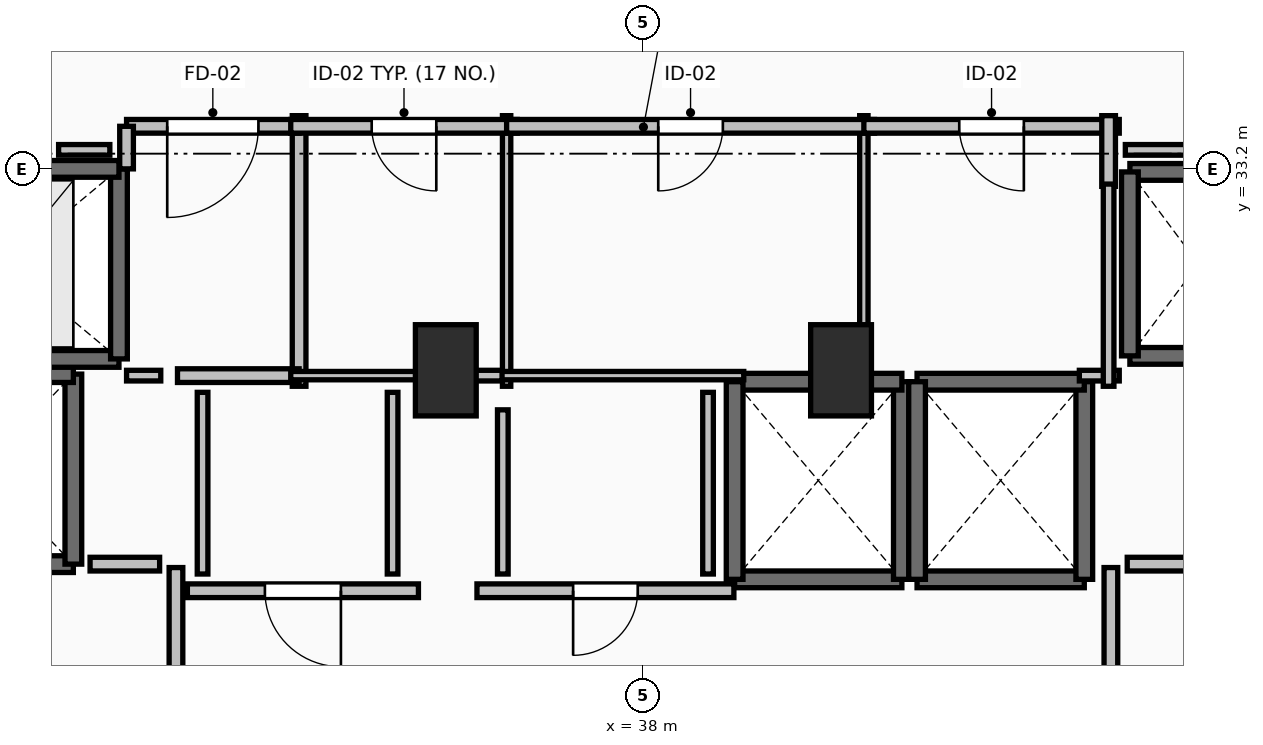
"""IFC4 building model, lengths in metres.
Left out: names, types, materials, properties, quantities, classifications, styles, units other than length and angle.
Written with IfcOpenShell. Run it as: python <this file> out.ifc"""

import sys

from ifc_helpers import new_model, si_unit, direction, frame, frame_2d, origin, origin_2d, place, context, subcontext, project, spatial, rectangle, extrude, element, fill, save


model = new_model("IFC4")
c1 = context("Model", 3, precision=1e-05, world=origin(), true_north=direction((0.0, 1.0)))
c2 = subcontext(c1, "Body", "Model", "MODEL_VIEW")
j1 = project(units=[si_unit("LENGTHUNIT", "METRE"), si_unit("PLANEANGLEUNIT", "RADIAN")], contexts=[c1])
p1 = place(None, origin())
s1 = spatial("IfcSite", under=j1, at=p1, CompositionType="ELEMENT")
p2 = place(p1, origin())
s2 = spatial("IfcBuilding", under=s1, at=p2, CompositionType="ELEMENT")
p3 = place(p2, frame((0.0, 0.0, 171.1)))
s3 = spatial("IfcBuildingStorey", under=s2, at=p3, CompositionType="ELEMENT", Elevation=171.1)
for number, where, z_axis, x_axis in (
    (1, (35.4, 30.55, 0.0), (0.0, 0.0, 1.0), (1.0, 0.0, 0.0)),
    (2, (40.6, 30.55, 0.0), (0.0, 0.0, 1.0), (1.0, 0.0, 0.0)),
):
    element("IfcColumn", number, at=place(p3, frame(where, z_axis=z_axis, x_axis=x_axis)), inside=s3, PredefinedType="PILASTER", context=c2, shape_type="SweptSolid", body=[
        extrude(rectangle(XDim=0.8, YDim=1.2, at=origin_2d()), origin(), (0.0, 0.0, 1.0), 3.5),
    ])
p4 = place(p3, frame((39.2, 27.8, 0.0), z_axis=(0.0, 0.0, 1.0), x_axis=(1.0, 0.0, 0.0)))
e3 = element("IfcWall", 3, at=p4, inside=s3, PredefinedType="SOLIDWALL", context=c2, shape_type="SweptSolid", body=[
    extrude(rectangle(XDim=2.2, YDim=0.22, at=frame_2d((1.1, 0.0))), origin(), (0.0, 0.0, 1.0), 3.2),
])
p5 = place(p3, frame((41.4, 27.8, 0.0), z_axis=(0.0, 0.0, 1.0), x_axis=(0.0, 1.0, 0.0)))
e4 = element("IfcWall", 4, at=p5, inside=s3, PredefinedType="SOLIDWALL", context=c2, shape_type="SweptSolid", body=[
    extrude(rectangle(XDim=2.6, YDim=0.22, at=frame_2d((1.3, 0.0))), origin(), (0.0, 0.0, 1.0), 3.2),
])
p6 = place(p3, frame((41.4, 30.4, 0.0), z_axis=(0.0, 0.0, 1.0), x_axis=(-1.0, 0.0, 0.0)))
e5 = element("IfcWall", 5, at=p6, inside=s3, PredefinedType="SOLIDWALL", context=c2, shape_type="SweptSolid", body=[
    extrude(rectangle(XDim=2.2, YDim=0.22, at=frame_2d((1.1, 0.0))), origin(), (0.0, 0.0, 1.0), 3.2),
])
p7 = place(p3, frame((39.2, 30.4, 0.0), z_axis=(0.0, 0.0, 1.0), x_axis=(0.0, -1.0, 0.0)))
e6 = element("IfcWall", 6, at=p7, inside=s3, PredefinedType="SOLIDWALL", context=c2, shape_type="SweptSolid", body=[
    extrude(rectangle(XDim=2.6, YDim=0.22, at=frame_2d((1.3, 0.0))), origin(), (0.0, 0.0, 1.0), 3.2),
])
p8 = place(p3, frame((41.6, 27.8, 0.0), z_axis=(0.0, 0.0, 1.0), x_axis=(1.0, 0.0, 0.0)))
e7 = element("IfcWall", 7, at=p8, inside=s3, PredefinedType="SOLIDWALL", context=c2, shape_type="SweptSolid", body=[
    extrude(rectangle(XDim=2.2, YDim=0.22, at=frame_2d((1.1, 0.0))), origin(), (0.0, 0.0, 1.0), 3.2),
])
p9 = place(p3, frame((43.8, 27.8, 0.0), z_axis=(0.0, 0.0, 1.0), x_axis=(0.0, 1.0, 0.0)))
e8 = element("IfcWall", 8, at=p9, inside=s3, PredefinedType="SOLIDWALL", context=c2, shape_type="SweptSolid", body=[
    extrude(rectangle(XDim=2.6, YDim=0.22, at=frame_2d((1.3, 0.0))), origin(), (0.0, 0.0, 1.0), 3.2),
])
p10 = place(p3, frame((43.8, 30.4, 0.0), z_axis=(0.0, 0.0, 1.0), x_axis=(-1.0, 0.0, 0.0)))
e9 = element("IfcWall", 9, at=p10, inside=s3, PredefinedType="SOLIDWALL", context=c2, shape_type="SweptSolid", body=[
    extrude(rectangle(XDim=2.2, YDim=0.22, at=frame_2d((1.1, 0.0))), origin(), (0.0, 0.0, 1.0), 3.2),
])
p11 = place(p3, frame((41.6, 30.4, 0.0), z_axis=(0.0, 0.0, 1.0), x_axis=(0.0, -1.0, 0.0)))
e10 = element("IfcWall", 10, at=p11, inside=s3, PredefinedType="SOLIDWALL", context=c2, shape_type="SweptSolid", body=[
    extrude(rectangle(XDim=2.6, YDim=0.22, at=frame_2d((1.3, 0.0))), origin(), (0.0, 0.0, 1.0), 3.2),
])
for number, where, z_axis, x_axis in (
    (11, (44.4, 30.74, 0.0), (0.0, 0.0, 1.0), (1.0, 0.0, 0.0)),
    (12, (46.2, 33.16, 0.0), (0.0, 0.0, 1.0), (-1.0, 0.0, 0.0)),
):
    element("IfcWall", number, at=place(p3, frame(where, z_axis=z_axis, x_axis=x_axis)), inside=s3, PredefinedType="SOLIDWALL", context=c2, shape_type="SweptSolid", body=[
        extrude(rectangle(XDim=1.8, YDim=0.22, at=frame_2d((0.9, 0.0))), origin(), (0.0, 0.0, 1.0), 3.2),
    ])
p12 = place(p3, frame((44.4, 33.16, 0.0), z_axis=(0.0, 0.0, 1.0), x_axis=(0.0, -1.0, 0.0)))
e13 = element("IfcWall", 13, at=p12, inside=s3, PredefinedType="SOLIDWALL", context=c2, shape_type="SweptSolid", body=[
    extrude(rectangle(XDim=2.42, YDim=0.22, at=frame_2d((1.21, 0.0))), origin(), (0.0, 0.0, 1.0), 3.2),
])
p13 = place(p3, frame((28.1, 28.0, 0.0), z_axis=(0.0, 0.0, 1.0), x_axis=(1.0, 0.0, 0.0)))
e14 = element("IfcWall", 14, at=p13, inside=s3, PredefinedType="SHEAR", context=c2, shape_type="SweptSolid", body=[
    extrude(rectangle(XDim=2.4, YDim=0.22, at=frame_2d((1.2, 0.0))), origin(), (0.0, 0.0, 1.0), 3.2),
])
p14 = place(p13, frame((0.6, 0.0, 0.0)))
e15 = element("IfcOpeningElement", 15, at=p14, cuts=e14, PredefinedType="OPENING", context=c2, shape_type="SweptSolid", body=[
    extrude(rectangle(XDim=1.2, YDim=2.2, at=frame_2d((0.6, 1.1))), frame((0.0, 0.125, 0.0), z_axis=(0.0, -1.0, 0.0), x_axis=(1.0, 0.0, 0.0)), (0.0, 0.0, 1.0), 0.25),
])
p15 = place(p3, frame((30.5, 28.0, 0.0), z_axis=(0.0, 0.0, 1.0), x_axis=(0.0, 1.0, 0.0)))
e16 = element("IfcWall", 16, at=p15, inside=s3, PredefinedType="SHEAR", context=c2, shape_type="SweptSolid", body=[
    extrude(rectangle(XDim=2.5, YDim=0.22, at=frame_2d((1.25, 0.0))), origin(), (0.0, 0.0, 1.0), 3.2),
])
p16 = place(p3, frame((30.5, 30.5, 0.0), z_axis=(0.0, 0.0, 1.0), x_axis=(-1.0, 0.0, 0.0)))
e17 = element("IfcWall", 17, at=p16, inside=s3, PredefinedType="SHEAR", context=c2, shape_type="SweptSolid", body=[
    extrude(rectangle(XDim=2.4, YDim=0.22, at=frame_2d((1.2, 0.0))), origin(), (0.0, 0.0, 1.0), 3.2),
])
p17 = place(p3, frame((28.1, 30.7, 0.0), z_axis=(0.0, 0.0, 1.0), x_axis=(1.0, 0.0, 0.0)))
e18 = element("IfcWall", 18, at=p17, inside=s3, PredefinedType="SOLIDWALL", context=c2, shape_type="SweptSolid", body=[
    extrude(rectangle(XDim=3.0, YDim=0.22, at=frame_2d((1.5, 0.0))), origin(), (0.0, 0.0, 1.0), 3.2),
])
p18 = place(p3, frame((31.1, 30.7, 0.0), z_axis=(0.0, 0.0, 1.0), x_axis=(0.0, 1.0, 0.0)))
e19 = element("IfcWall", 19, at=p18, inside=s3, PredefinedType="SOLIDWALL", context=c2, shape_type="SweptSolid", body=[
    extrude(rectangle(XDim=2.5, YDim=0.22, at=frame_2d((1.25, 0.0))), origin(), (0.0, 0.0, 1.0), 3.2),
])
p19 = place(p3, frame((31.1, 33.2, 0.0), z_axis=(0.0, 0.0, 1.0), x_axis=(-1.0, 0.0, 0.0)))
e20 = element("IfcWall", 20, at=p19, inside=s3, PredefinedType="SOLIDWALL", context=c2, shape_type="SweptSolid", body=[
    extrude(rectangle(XDim=3.0, YDim=0.22, at=frame_2d((1.5, 0.0))), origin(), (0.0, 0.0, 1.0), 3.2),
])
p20 = place(p19, frame((0.9, 0.0, 0.0)))
e21 = element("IfcOpeningElement", 21, at=p20, cuts=e20, PredefinedType="OPENING", context=c2, shape_type="SweptSolid", body=[
    extrude(rectangle(XDim=1.2, YDim=2.2, at=frame_2d((0.6, 1.1))), frame((0.0, 0.125, 0.0), z_axis=(0.0, -1.0, 0.0), x_axis=(1.0, 0.0, 0.0)), (0.0, 0.0, 1.0), 0.25),
])
p21 = place(p3, frame((31.85, 24.045, 0.0), z_axis=(0.0, 0.0, 1.0), x_axis=(0.0, 1.0, 0.0)))
e22 = element("IfcWall", 22, at=p21, inside=s3, PredefinedType="PARTITIONING", context=c2, shape_type="SweptSolid", body=[
    extrude(rectangle(XDim=3.91, YDim=0.18, at=frame_2d((1.955, 0.0))), origin(), (0.0, 0.0, 1.0), 3.2),
])
p22 = place(p21, frame((1.355, 0.0, 0.0)))
e23 = element("IfcOpeningElement", 23, at=p22, cuts=e22, PredefinedType="OPENING", context=c2, shape_type="SweptSolid", body=[
    extrude(rectangle(XDim=1.2, YDim=2.15, at=frame_2d((0.6, 1.075))), frame((0.0, 0.105, 0.0), z_axis=(0.0, -1.0, 0.0), x_axis=(1.0, 0.0, 0.0)), (0.0, 0.0, 1.0), 0.21),
])
p23 = place(p3, frame((44.15, 27.955, 0.0), z_axis=(0.0, 0.0, 1.0), x_axis=(0.0, -1.0, 0.0)))
e24 = element("IfcWall", 24, at=p23, inside=s3, PredefinedType="PARTITIONING", context=c2, shape_type="SweptSolid", body=[
    extrude(rectangle(XDim=3.91, YDim=0.18, at=frame_2d((1.955, 0.0))), origin(), (0.0, 0.0, 1.0), 3.2),
])
p24 = place(p23, frame((1.355, 0.0, 0.0)))
e25 = element("IfcOpeningElement", 25, at=p24, cuts=e24, PredefinedType="OPENING", context=c2, shape_type="SweptSolid", body=[
    extrude(rectangle(XDim=1.2, YDim=2.15, at=frame_2d((0.6, 1.075))), frame((0.0, 0.105, 0.0), z_axis=(0.0, -1.0, 0.0), x_axis=(1.0, 0.0, 0.0)), (0.0, 0.0, 1.0), 0.21),
])
p25 = place(p3, frame((33.47, 30.34, 0.0), z_axis=(0.0, 0.0, 1.0), x_axis=(0.0, 1.0, 0.0)))
e26 = element("IfcWall", 26, at=p25, inside=s3, PredefinedType="PARTITIONING", context=c2, shape_type="SweptSolid", body=[
    extrude(rectangle(XDim=3.56, YDim=0.18, at=frame_2d((1.78, 0.0))), origin(), (0.0, 0.0, 1.0), 3.2),
])
p26 = place(p3, frame((31.87, 30.48, 0.0), z_axis=(0.0, 0.0, 1.0), x_axis=(1.0, 0.0, 0.0)))
e27 = element("IfcWall", 27, at=p26, inside=s3, PredefinedType="PARTITIONING", context=c2, shape_type="SweptSolid", body=[
    extrude(rectangle(XDim=1.6, YDim=0.18, at=frame_2d((0.8, 0.0))), origin(), (0.0, 0.0, 1.0), 3.2),
])
p27 = place(p3, frame((33.47, 33.76, 0.0), z_axis=(0.0, 0.0, 1.0), x_axis=(-1.0, 0.0, 0.0)))
e28 = element("IfcWall", 28, at=p27, inside=s3, PredefinedType="PARTITIONING", context=c2, shape_type="SweptSolid", body=[
    extrude(rectangle(XDim=2.27, YDim=0.18, at=frame_2d((1.135, 0.0))), origin(), (0.0, 0.0, 1.0), 3.2),
])
p28 = place(p27, frame((0.535, 0.0, 0.0)))
e29 = element("IfcOpeningElement", 29, at=p28, cuts=e28, PredefinedType="OPENING", context=c2, shape_type="SweptSolid", body=[
    extrude(rectangle(XDim=1.2, YDim=2.15, at=frame_2d((0.6, 1.075))), frame((0.0, 0.105, 0.0), z_axis=(0.0, -1.0, 0.0), x_axis=(1.0, 0.0, 0.0)), (0.0, 0.0, 1.0), 0.21),
])
p29 = place(p3, frame((31.2, 33.76, 0.0), z_axis=(0.0, 0.0, 1.0), x_axis=(0.0, -1.0, 0.0)))
e30 = element("IfcWall", 30, at=p29, inside=s3, PredefinedType="PARTITIONING", context=c2, shape_type="SweptSolid", body=[
    extrude(rectangle(XDim=0.56, YDim=0.18, at=frame_2d((0.28, 0.0))), origin(), (0.0, 0.0, 1.0), 3.2),
])
p30 = place(p3, frame((35.04, 27.65, 0.0), z_axis=(0.0, 0.0, 1.0), x_axis=(-1.0, 0.0, 0.0)))
e31 = element("IfcWall", 31, at=p30, inside=s3, PredefinedType="PARTITIONING", context=c2, shape_type="SweptSolid", body=[
    extrude(rectangle(XDim=3.04, YDim=0.18, at=frame_2d((1.52, 0.0))), origin(), (0.0, 0.0, 1.0), 3.2),
])
p31 = place(p30, frame((1.02, 0.0, 0.0)))
e32 = element("IfcOpeningElement", 32, at=p31, cuts=e31, PredefinedType="OPENING", context=c2, shape_type="SweptSolid", body=[
    extrude(rectangle(XDim=1.0, YDim=2.15, at=frame_2d((0.5, 1.075))), frame((0.0, 0.105, 0.0), z_axis=(0.0, -1.0, 0.0), x_axis=(1.0, 0.0, 0.0)), (0.0, 0.0, 1.0), 0.21),
])
p32 = place(p3, frame((39.19, 27.65, 0.0), z_axis=(0.0, 0.0, 1.0), x_axis=(-1.0, 0.0, 0.0)))
e33 = element("IfcWall", 33, at=p32, inside=s3, PredefinedType="PARTITIONING", context=c2, shape_type="SweptSolid", body=[
    extrude(rectangle(XDim=3.38, YDim=0.18, at=frame_2d((1.69, 0.0))), origin(), (0.0, 0.0, 1.0), 3.2),
])
p33 = place(p32, frame((1.265, 0.0, 0.0)))
e34 = element("IfcOpeningElement", 34, at=p33, cuts=e33, PredefinedType="OPENING", context=c2, shape_type="SweptSolid", body=[
    extrude(rectangle(XDim=0.85, YDim=2.1, at=frame_2d((0.425, 1.05))), frame((0.0, 0.105, 0.0), z_axis=(0.0, -1.0, 0.0), x_axis=(1.0, 0.0, 0.0)), (0.0, 0.0, 1.0), 0.21),
])
p34 = place(p3, frame((36.2, 30.34, 0.0), z_axis=(0.0, 0.0, 1.0), x_axis=(0.0, 1.0, 0.0)))
e35 = element("IfcWall", 35, at=p34, inside=s3, PredefinedType="PARTITIONING", context=c2, shape_type="SweptSolid", body=[
    extrude(rectangle(XDim=3.56, YDim=0.11, at=frame_2d((1.78, 0.0))), origin(), (0.0, 0.0, 1.0), 2.392),
])
p35 = place(p3, frame((33.36, 30.48, 0.0), z_axis=(0.0, 0.0, 1.0), x_axis=(1.0, 0.0, 0.0)))
e36 = element("IfcWall", 36, at=p35, inside=s3, PredefinedType="PARTITIONING", context=c2, shape_type="SweptSolid", body=[
    extrude(rectangle(XDim=1.81, YDim=0.11, at=frame_2d((0.905, 0.0))), origin(), (0.0, 0.0, 1.0), 3.2),
])
p36 = place(p3, frame((36.34, 33.76, 0.0), z_axis=(0.0, 0.0, 1.0), x_axis=(-1.0, 0.0, 0.0)))
e37 = element("IfcWall", 37, at=p36, inside=s3, PredefinedType="PARTITIONING", context=c2, shape_type="SweptSolid", body=[
    extrude(rectangle(XDim=2.98, YDim=0.18, at=frame_2d((1.49, 0.0))), origin(), (0.0, 0.0, 1.0), 3.2),
])
p37 = place(p36, frame((1.065, 0.0, 0.0)))
e38 = element("IfcOpeningElement", 38, at=p37, cuts=e37, PredefinedType="OPENING", context=c2, shape_type="SweptSolid", body=[
    extrude(rectangle(XDim=0.85, YDim=2.1, at=frame_2d((0.425, 1.05))), frame((0.0, 0.105, 0.0), z_axis=(0.0, -1.0, 0.0), x_axis=(1.0, 0.0, 0.0)), (0.0, 0.0, 1.0), 0.21),
])
p38 = place(p3, frame((40.9, 30.34, 0.0), z_axis=(0.0, 0.0, 1.0), x_axis=(0.0, 1.0, 0.0)))
e39 = element("IfcWall", 39, at=p38, inside=s3, PredefinedType="PARTITIONING", context=c2, shape_type="SweptSolid", body=[
    extrude(rectangle(XDim=3.56, YDim=0.11, at=frame_2d((1.78, 0.0))), origin(), (0.0, 0.0, 1.0), 3.2),
])
p39 = place(p3, frame((36.11, 30.48, 0.0), z_axis=(0.0, 0.0, 1.0), x_axis=(1.0, 0.0, 0.0)))
e40 = element("IfcWall", 40, at=p39, inside=s3, PredefinedType="PARTITIONING", context=c2, shape_type="SweptSolid", body=[
    extrude(rectangle(XDim=3.21, YDim=0.11, at=frame_2d((1.605, 0.0))), origin(), (0.0, 0.0, 1.0), 2.392),
])
p40 = place(p3, frame((41.04, 33.76, 0.0), z_axis=(0.0, 0.0, 1.0), x_axis=(-1.0, 0.0, 0.0)))
e41 = element("IfcWall", 41, at=p40, inside=s3, PredefinedType="PARTITIONING", context=c2, shape_type="SweptSolid", body=[
    extrude(rectangle(XDim=4.84, YDim=0.18, at=frame_2d((2.42, 0.0))), origin(), (0.0, 0.0, 1.0), 3.2),
])
p41 = place(p40, frame((1.995, 0.0, 0.0)))
e42 = element("IfcOpeningElement", 42, at=p41, cuts=e41, PredefinedType="OPENING", context=c2, shape_type="SweptSolid", body=[
    extrude(rectangle(XDim=0.85, YDim=2.1, at=frame_2d((0.425, 1.05))), frame((0.0, 0.105, 0.0), z_axis=(0.0, -1.0, 0.0), x_axis=(1.0, 0.0, 0.0)), (0.0, 0.0, 1.0), 0.21),
])
p42 = place(p3, frame((44.26, 33.76, 0.0), z_axis=(0.0, 0.0, 1.0), x_axis=(-1.0, 0.0, 0.0)))
e43 = element("IfcWall", 43, at=p42, inside=s3, PredefinedType="PARTITIONING", context=c2, shape_type="SweptSolid", body=[
    extrude(rectangle(XDim=3.36, YDim=0.18, at=frame_2d((1.68, 0.0))), origin(), (0.0, 0.0, 1.0), 3.2),
])
p43 = place(p42, frame((1.255, 0.0, 0.0)))
e44 = element("IfcOpeningElement", 44, at=p43, cuts=e43, PredefinedType="OPENING", context=c2, shape_type="SweptSolid", body=[
    extrude(rectangle(XDim=0.85, YDim=2.1, at=frame_2d((0.425, 1.05))), frame((0.0, 0.105, 0.0), z_axis=(0.0, -1.0, 0.0), x_axis=(1.0, 0.0, 0.0)), (0.0, 0.0, 1.0), 0.21),
])
p44 = place(p3, frame((44.12, 32.97, 0.0), z_axis=(0.0, 0.0, 1.0), x_axis=(0.0, 1.0, 0.0)))
e45 = element("IfcWall", 45, at=p44, inside=s3, PredefinedType="PARTITIONING", context=c2, shape_type="SweptSolid", body=[
    extrude(rectangle(XDim=0.93, YDim=0.18, at=frame_2d((0.465, 0.0))), origin(), (0.0, 0.0, 1.0), 3.2),
])
for number, where, z_axis, x_axis in (
    (46, (31.635, 28.0, 0.0), (0.0, 0.0, 1.0), (-1.0, 0.0, 0.0)),
    (47, (45.28, 28.0, 0.0), (0.0, 0.0, 1.0), (-1.0, 0.0, 0.0)),
):
    element("IfcWall", number, at=place(p3, frame(where, z_axis=z_axis, x_axis=x_axis)), inside=s3, PredefinedType="PARTITIONING", context=c2, shape_type="SweptSolid", body=[
        extrude(rectangle(XDim=0.915, YDim=0.18, at=frame_2d((0.458, 0.0))), origin(), (0.0, 0.0, 1.0), 3.2),
    ])
p45 = place(p3, frame((31.2, 30.48, 0.0), z_axis=(0.0, 0.0, 1.0), x_axis=(1.0, 0.0, 0.0)))
e48 = element("IfcWall", 48, at=p45, inside=s3, PredefinedType="PARTITIONING", context=c2, shape_type="SweptSolid", body=[
    extrude(rectangle(XDim=0.45, YDim=0.14, at=frame_2d((0.225, 0.0))), origin(), (0.0, 0.0, 1.0), 3.2),
])
p46 = place(p3, frame((35.14, 30.48, 0.0), z_axis=(0.0, 0.0, 1.0), x_axis=(1.0, 0.0, 0.0)))
e49 = element("IfcWall", 49, at=p46, inside=s3, PredefinedType="PARTITIONING", context=c2, shape_type="SweptSolid", body=[
    extrude(rectangle(XDim=1.0, YDim=0.14, at=frame_2d((0.5, 0.0))), origin(), (0.0, 0.0, 1.0), 2.392),
])
p47 = place(p3, frame((43.735, 30.48, 0.0), z_axis=(0.0, 0.0, 1.0), x_axis=(1.0, 0.0, 0.0)))
e50 = element("IfcWall", 50, at=p47, inside=s3, PredefinedType="PARTITIONING", context=c2, shape_type="SweptSolid", body=[
    extrude(rectangle(XDim=0.525, YDim=0.14, at=frame_2d((0.262, 0.0))), origin(), (0.0, 0.0, 1.0), 3.2),
])
p48 = place(p3, frame((44.12, 30.34, 0.0), z_axis=(0.0, 0.0, 1.0), x_axis=(0.0, 1.0, 0.0)))
e51 = element("IfcWall", 51, at=p48, inside=s3, PredefinedType="PARTITIONING", context=c2, shape_type="SweptSolid", body=[
    extrude(rectangle(XDim=2.66, YDim=0.14, at=frame_2d((1.33, 0.0))), origin(), (0.0, 0.0, 1.0), 3.2),
])
for number, where, z_axis, x_axis in (
    (52, (32.2, 30.26, 0.0), (0.0, 0.0, 1.0), (0.0, -1.0, 0.0)),
    (53, (34.7, 27.87, 0.0), (0.0, 0.0, 1.0), (0.0, 1.0, 0.0)),
):
    element("IfcWall", number, at=place(p3, frame(where, z_axis=z_axis, x_axis=x_axis)), inside=s3, PredefinedType="PARTITIONING", context=c2, shape_type="SweptSolid", body=[
        extrude(rectangle(XDim=2.39, YDim=0.14, at=frame_2d((1.195, 0.0))), origin(), (0.0, 0.0, 1.0), 3.2),
    ])
p49 = place(p3, frame((36.15, 30.03, 0.0), z_axis=(0.0, 0.0, 1.0), x_axis=(0.0, -1.0, 0.0)))
e54 = element("IfcWall", 54, at=p49, inside=s3, PredefinedType="PARTITIONING", context=c2, shape_type="SweptSolid", body=[
    extrude(rectangle(XDim=2.16, YDim=0.14, at=frame_2d((1.08, 0.0))), origin(), (0.0, 0.0, 1.0), 3.2),
])
p50 = place(p3, frame((38.85, 27.87, 0.0), z_axis=(0.0, 0.0, 1.0), x_axis=(0.0, 1.0, 0.0)))
e55 = element("IfcWall", 55, at=p50, inside=s3, PredefinedType="PARTITIONING", context=c2, shape_type="SweptSolid", body=[
    extrude(rectangle(XDim=2.39, YDim=0.14, at=frame_2d((1.195, 0.0))), origin(), (0.0, 0.0, 1.0), 3.2),
])
p51 = place(p3, frame((48.55, 33.45, 0.0), z_axis=(0.0, 0.0, 1.0), x_axis=(-1.0, 0.0, 0.0)))
e56 = element("IfcWall", 56, at=p51, inside=s3, PredefinedType="PARTITIONING", context=c2, shape_type="SweptSolid", body=[
    extrude(rectangle(XDim=4.21, YDim=0.14, at=frame_2d((2.105, 0.0))), origin(), (0.0, 0.0, 1.0), 2.392),
])
p52 = place(p3, frame((30.98, 33.45, 0.0), z_axis=(0.0, 0.0, 1.0), x_axis=(-1.0, 0.0, 0.0)))
e57 = element("IfcWall", 57, at=p52, inside=s3, PredefinedType="PARTITIONING", context=c2, shape_type="SweptSolid", body=[
    extrude(rectangle(XDim=0.674, YDim=0.14, at=frame_2d((0.337, 0.0))), origin(), (0.0, 0.0, 1.0), 3.2),
])
p53 = place(p28, origin())
e58 = element("IfcDoor", 58, at=p53, inside=s3, OperationType="SINGLE_SWING_RIGHT", PredefinedType="DOOR", context=c2, shape_type="SweptSolid", body=[
    extrude(rectangle(XDim=1.2, YDim=2.15, at=frame_2d((0.6, 1.075))), frame((0.0, 0.025, 0.0), z_axis=(0.0, -1.0, 0.0), x_axis=(1.0, 0.0, 0.0)), (0.0, 0.0, 1.0), 0.05),
])
fill(e29, e58)
p54 = place(p31, origin())
e59 = element("IfcDoor", 59, at=p54, inside=s3, OperationType="SINGLE_SWING_LEFT", PredefinedType="DOOR", context=c2, shape_type="SweptSolid", body=[
    extrude(rectangle(XDim=1.0, YDim=2.15, at=frame_2d((0.5, 1.075))), frame((0.0, 0.025, 0.0), z_axis=(0.0, -1.0, 0.0), x_axis=(1.0, 0.0, 0.0)), (0.0, 0.0, 1.0), 0.05),
])
fill(e32, e59)
p55 = place(p33, origin())
e60 = element("IfcDoor", 60, at=p55, inside=s3, OperationType="SINGLE_SWING_RIGHT", PredefinedType="DOOR", context=c2, shape_type="SweptSolid", body=[
    extrude(rectangle(XDim=0.85, YDim=2.1, at=frame_2d((0.425, 1.05))), frame((0.0, 0.025, 0.0), z_axis=(0.0, -1.0, 0.0), x_axis=(1.0, 0.0, 0.0)), (0.0, 0.0, 1.0), 0.05),
])
fill(e34, e60)
p56 = place(p37, origin())
e61 = element("IfcDoor", 61, at=p56, inside=s3, OperationType="SINGLE_SWING_LEFT", PredefinedType="DOOR", context=c2, shape_type="SweptSolid", body=[
    extrude(rectangle(XDim=0.85, YDim=2.1, at=frame_2d((0.425, 1.05))), frame((0.0, 0.025, 0.0), z_axis=(0.0, -1.0, 0.0), x_axis=(1.0, 0.0, 0.0)), (0.0, 0.0, 1.0), 0.05),
])
fill(e38, e61)
p57 = place(p41, origin())
e62 = element("IfcDoor", 62, at=p57, inside=s3, OperationType="SINGLE_SWING_RIGHT", PredefinedType="DOOR", context=c2, shape_type="SweptSolid", body=[
    extrude(rectangle(XDim=0.85, YDim=2.1, at=frame_2d((0.425, 1.05))), frame((0.0, 0.025, 0.0), z_axis=(0.0, -1.0, 0.0), x_axis=(1.0, 0.0, 0.0)), (0.0, 0.0, 1.0), 0.05),
])
fill(e42, e62)
p58 = place(p43, origin())
e63 = element("IfcDoor", 63, at=p58, inside=s3, OperationType="SINGLE_SWING_LEFT", PredefinedType="DOOR", context=c2, shape_type="SweptSolid", body=[
    extrude(rectangle(XDim=0.85, YDim=2.1, at=frame_2d((0.425, 1.05))), frame((0.0, 0.025, 0.0), z_axis=(0.0, -1.0, 0.0), x_axis=(1.0, 0.0, 0.0)), (0.0, 0.0, 1.0), 0.05),
])
fill(e44, e63)
save(model, sys.argv[1])
